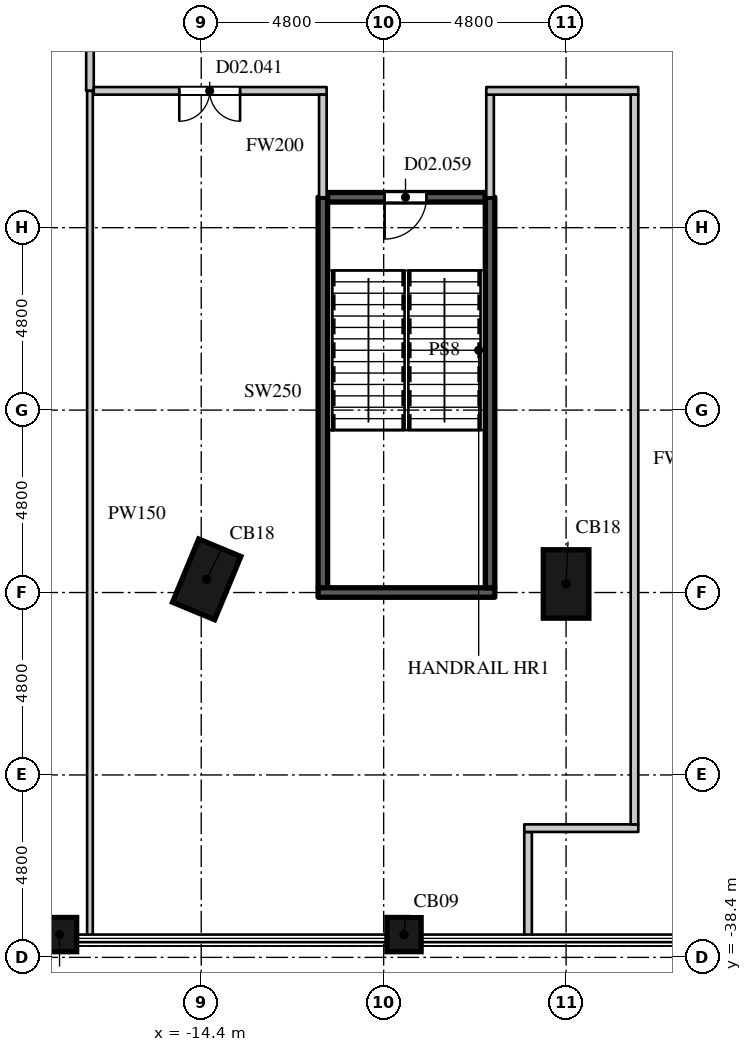
"""IFC4 building model, lengths in metres.
Left out: names, types, materials, properties, quantities, classifications, styles, units other than length and angle.
Written with IfcOpenShell. Run it as: python <this file> out.ifc"""

import sys

from ifc_helpers import new_model, si_unit, direction, frame, frame_2d, origin, origin_2d, place, context, subcontext, project, spatial, rectangle, extrude, element, fill, save


model = new_model("IFC4")
c1 = context("Model", 3, precision=1e-05, world=origin(), true_north=direction((0.0, 1.0)))
c2 = subcontext(c1, "Body", "Model", "MODEL_VIEW")
j1 = project(units=[si_unit("LENGTHUNIT", "METRE"), si_unit("PLANEANGLEUNIT", "RADIAN")], contexts=[c1])
p1 = place(None, origin())
s1 = spatial("IfcSite", under=j1, at=p1, CompositionType="ELEMENT")
p2 = place(p1, origin())
s2 = spatial("IfcBuilding", under=s1, at=p2, CompositionType="ELEMENT")
p3 = place(p2, frame((0.0, 0.0, 11.0)))
s3 = spatial("IfcBuildingStorey", under=s2, at=p3, CompositionType="ELEMENT", Elevation=11.0)
for number, where, z_axis, x_axis in (
    (1, (-18.128, -37.8, 0.0), (0.0, 0.0, 1.0), (1.0, 0.0, 0.0)),
    (2, (-9.064, -37.8, 0.0), (0.0, 0.0, 1.0), (1.0, 0.0, 0.0)),
):
    element("IfcColumn", number, at=place(p3, frame(where, z_axis=z_axis, x_axis=x_axis)), inside=s3, PredefinedType="COLUMN", context=c2, shape_type="SweptSolid", body=[
        extrude(rectangle(XDim=0.9, YDim=0.9, at=origin_2d()), origin(), (0.0, 0.0, 1.0), 5.0),
    ])
for number, where, z_axis, x_axis in (
    (3, (-4.8, -28.575, 0.0), (0.0, 0.0, 1.0), (1.0, 0.0, 0.0)),
    (4, (-14.257, -28.454, 0.0), (0.0, 0.0, 1.0), (0.924, -0.383, 0.0)),
):
    element("IfcColumn", number, at=place(p3, frame(where, z_axis=z_axis, x_axis=x_axis)), inside=s3, PredefinedType="COLUMN", context=c2, shape_type="SweptSolid", body=[
        extrude(rectangle(XDim=1.2, YDim=1.8, at=origin_2d()), origin(), (0.0, 0.0, 1.0), 5.0),
    ])
p4 = place(p3, frame((-17.328, -15.6, 0.0), z_axis=(0.0, 0.0, 1.0), x_axis=(0.0, 1.0, 0.0)))
e5 = element("IfcWall", 5, at=p4, inside=s3, PredefinedType="PARTITIONING", context=c2, shape_type="SweptSolid", body=[
    extrude(rectangle(XDim=4.3, YDim=0.2, at=frame_2d((2.15, 0.0))), origin(), (0.0, 0.0, 1.0), 4.65),
])
p5 = place(p3, frame((-17.228, -15.6, 0.0), z_axis=(0.0, 0.0, 1.0), x_axis=(1.0, 0.0, 0.0)))
e6 = element("IfcWall", 6, at=p5, inside=s3, PredefinedType="PARTITIONING", context=c2, shape_type="SweptSolid", body=[
    extrude(rectangle(XDim=6.128, YDim=0.2, at=frame_2d((3.064, 0.0))), origin(), (0.0, 0.0, 1.0), 4.65),
])
p6 = place(p5, frame((2.25, 0.0, 0.0)))
e7 = element("IfcOpeningElement", 7, at=p6, cuts=e6, PredefinedType="OPENING", context=c2, shape_type="SweptSolid", body=[
    extrude(rectangle(XDim=1.6, YDim=2.4, at=frame_2d((0.8, 1.2))), frame((0.0, 0.11, 0.0), z_axis=(0.0, -1.0, 0.0), x_axis=(1.0, 0.0, 0.0)), (0.0, 0.0, 1.0), 0.22),
])
for number, where, z_axis, x_axis in (
    (8, (-11.2, -18.4, 0.0), (0.0, 0.0, 1.0), (0.0, 1.0, 0.0)),
    (9, (-6.8, -18.4, 0.0), (0.0, 0.0, 1.0), (0.0, 1.0, 0.0)),
):
    element("IfcWall", number, at=place(p3, frame(where, z_axis=z_axis, x_axis=x_axis)), inside=s3, PredefinedType="PARTITIONING", context=c2, shape_type="SweptSolid", body=[
        extrude(rectangle(XDim=2.7, YDim=0.2, at=frame_2d((1.35, 0.0))), origin(), (0.0, 0.0, 1.0), 4.65),
    ])
p7 = place(p3, frame((-6.9, -15.6, 0.0), z_axis=(0.0, 0.0, 1.0), x_axis=(1.0, 0.0, 0.0)))
e10 = element("IfcWall", 10, at=p7, inside=s3, PredefinedType="PARTITIONING", context=c2, shape_type="SweptSolid", body=[
    extrude(rectangle(XDim=4.0, YDim=0.2, at=frame_2d((2.0, 0.0))), origin(), (0.0, 0.0, 1.0), 4.65),
])
p8 = place(p3, frame((-5.8, -37.855, 0.0), z_axis=(0.0, 0.0, 1.0), x_axis=(0.0, 1.0, 0.0)))
e11 = element("IfcWall", 11, at=p8, inside=s3, PredefinedType="PARTITIONING", context=c2, shape_type="SweptSolid", body=[
    extrude(rectangle(XDim=2.755, YDim=0.2, at=frame_2d((1.377, 0.0))), origin(), (0.0, 0.0, 1.0), 4.65),
])
p9 = place(p3, frame((-5.9, -35.0, 0.0), z_axis=(0.0, 0.0, 1.0), x_axis=(1.0, 0.0, 0.0)))
e12 = element("IfcWall", 12, at=p9, inside=s3, PredefinedType="PARTITIONING", context=c2, shape_type="SweptSolid", body=[
    extrude(rectangle(XDim=3.0, YDim=0.2, at=frame_2d((1.5, 0.0))), origin(), (0.0, 0.0, 1.0), 4.65),
])
p10 = place(p3, frame((-3.0, -34.9, 0.0), z_axis=(0.0, 0.0, 1.0), x_axis=(0.0, 1.0, 0.0)))
e13 = element("IfcWall", 13, at=p10, inside=s3, PredefinedType="PARTITIONING", context=c2, shape_type="SweptSolid", body=[
    extrude(rectangle(XDim=19.2, YDim=0.2, at=frame_2d((9.6, 0.0))), origin(), (0.0, 0.0, 1.0), 4.65),
])
p11 = place(p3, frame((-17.328, -37.855, 0.0), z_axis=(0.0, 0.0, 1.0), x_axis=(0.0, 1.0, 0.0)))
e14 = element("IfcWall", 14, at=p11, inside=s3, PredefinedType="PARTITIONING", context=c2, shape_type="SweptSolid", body=[
    extrude(rectangle(XDim=22.255, YDim=0.15, at=frame_2d((11.127, 0.0))), origin(), (0.0, 0.0, 1.0), 4.65),
])
p12 = place(p3, frame((-11.2, -28.675, 0.0), z_axis=(0.0, 0.0, 1.0), x_axis=(0.0, 1.0, 0.0)))
e15 = element("IfcWall", 15, at=p12, inside=s3, PredefinedType="SHEAR", context=c2, shape_type="SweptSolid", body=[
    extrude(rectangle(XDim=10.275, YDim=0.25, at=frame_2d((5.138, 0.0))), origin(), (0.0, 0.0, 1.0), 4.65),
])
p13 = place(p3, frame((-11.325, -28.8, 0.0), z_axis=(0.0, 0.0, 1.0), x_axis=(1.0, 0.0, 0.0)))
e16 = element("IfcWall", 16, at=p13, inside=s3, PredefinedType="SHEAR", context=c2, shape_type="SweptSolid", body=[
    extrude(rectangle(XDim=4.65, YDim=0.25, at=frame_2d((2.325, 0.0))), origin(), (0.0, 0.0, 1.0), 4.65),
])
p14 = place(p3, frame((-11.075, -18.4, 0.0), z_axis=(0.0, 0.0, 1.0), x_axis=(1.0, 0.0, 0.0)))
e17 = element("IfcWall", 17, at=p14, inside=s3, PredefinedType="SHEAR", context=c2, shape_type="SweptSolid", body=[
    extrude(rectangle(XDim=4.15, YDim=0.25, at=frame_2d((2.075, 0.0))), origin(), (0.0, 0.0, 1.0), 4.65),
])
p15 = place(p14, frame((1.5, 0.0, 0.0)))
e18 = element("IfcOpeningElement", 18, at=p15, cuts=e17, PredefinedType="OPENING", context=c2, shape_type="SweptSolid", body=[
    extrude(rectangle(XDim=1.1, YDim=2.2, at=frame_2d((0.55, 1.1))), frame((0.0, 0.135, 0.0), z_axis=(0.0, -1.0, 0.0), x_axis=(1.0, 0.0, 0.0)), (0.0, 0.0, 1.0), 0.27),
])
p16 = place(p3, frame((-6.8, -28.675, 0.0), z_axis=(0.0, 0.0, 1.0), x_axis=(0.0, 1.0, 0.0)))
e19 = element("IfcWall", 19, at=p16, inside=s3, PredefinedType="SHEAR", context=c2, shape_type="SweptSolid", body=[
    extrude(rectangle(XDim=10.275, YDim=0.25, at=frame_2d((5.138, 0.0))), origin(), (0.0, 0.0, 1.0), 4.65),
])
p17 = place(p6, origin())
e20 = element("IfcDoor", 20, at=p17, inside=s3, OperationType="DOUBLE_DOOR_SINGLE_SWING", PredefinedType="DOOR", context=c2, shape_type="SweptSolid", body=[
    extrude(rectangle(XDim=1.6, YDim=2.4, at=frame_2d((0.8, 1.2))), frame((0.0, 0.025, 0.0), z_axis=(0.0, -1.0, 0.0), x_axis=(1.0, 0.0, 0.0)), (0.0, 0.0, 1.0), 0.05),
])
fill(e7, e20)
p18 = place(p15, origin())
e21 = element("IfcDoor", 21, at=p18, inside=s3, OperationType="SINGLE_SWING_RIGHT", PredefinedType="DOOR", context=c2, shape_type="SweptSolid", body=[
    extrude(rectangle(XDim=1.1, YDim=2.2, at=frame_2d((0.55, 1.1))), frame((0.0, 0.025, 0.0), z_axis=(0.0, -1.0, 0.0), x_axis=(1.0, 0.0, 0.0)), (0.0, 0.0, 1.0), 0.05),
])
fill(e18, e21)
save(model, sys.argv[1])
